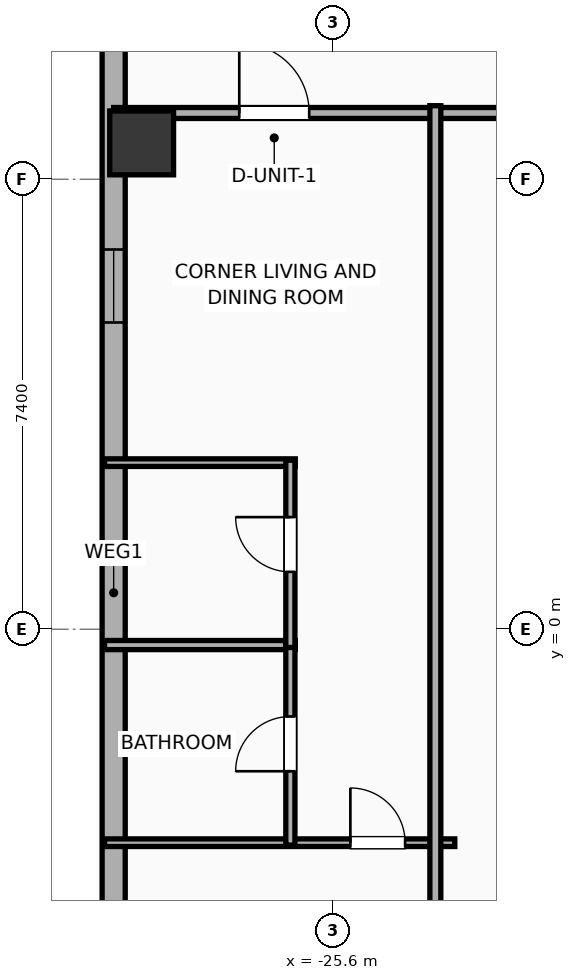
"""IFC4 building model, lengths in metres.
Left out: names, types, materials, properties, quantities, classifications, styles, units other than length and angle.
Written with IfcOpenShell. Run it as: python <this file> out.ifc"""

import sys

from ifc_helpers import new_model, si_unit, direction, frame, frame_2d, origin, origin_2d, place, context, subcontext, project, spatial, rectangle, hollow_rectangle, extrude, element, fill, save


model = new_model("IFC4")
c1 = context("Model", 3, precision=1e-05, world=origin(), true_north=direction((0.0, 1.0)))
c2 = subcontext(c1, "Body", "Model", "MODEL_VIEW")
j1 = project(units=[si_unit("LENGTHUNIT", "METRE"), si_unit("PLANEANGLEUNIT", "RADIAN")], contexts=[c1])
p1 = place(None, origin())
s1 = spatial("IfcSite", under=j1, at=p1, CompositionType="ELEMENT")
p2 = place(p1, origin())
s2 = spatial("IfcBuilding", under=s1, at=p2, CompositionType="ELEMENT")
p3 = place(p2, frame((0.0, 0.0, 105.3)))
s3 = spatial("IfcBuildingStorey", under=s2, at=p3, CompositionType="ELEMENT", Elevation=105.3)
p4 = place(p3, frame((-28.75, 7.998, 0.0), z_axis=(0.0, 0.0, 1.0), x_axis=(1.0, 0.0, 0.0)))
e1 = element("IfcColumn", 1, at=p4, inside=s3, PredefinedType="COLUMN", context=c2, shape_type="SweptSolid", body=[
    extrude(hollow_rectangle(XDim=1.05, YDim=1.05, WallThickness=0.036, at=origin_2d()), origin(), (0.0, 0.0, 1.0), 3.9),
])
p5 = place(p3, frame((-29.21, -16.581, 0.0), z_axis=(0.0, 0.0, 1.0), x_axis=(0.0, 1.0, 0.0)))
e2 = element("IfcWall", 2, at=p5, inside=s3, PredefinedType="ELEMENTEDWALL", context=c2, shape_type="SweptSolid", body=[
    extrude(rectangle(XDim=34.363, YDim=0.38, at=frame_2d((17.181, 0.0))), origin(), (0.0, 0.0, 1.0), 3.65),
])
p6 = place(p5, frame((31.087, 0.0, 0.75)))
e3 = element("IfcOpeningElement", 3, at=p6, cuts=e2, PredefinedType="OPENING", context=c2, shape_type="SweptSolid", body=[
    extrude(rectangle(XDim=1.2, YDim=2.05, at=frame_2d((0.6, 1.025))), frame((0.0, 0.2, 0.0), z_axis=(0.0, -1.0, 0.0), x_axis=(1.0, 0.0, 0.0)), (0.0, 0.0, 1.0), 0.4),
])
p7 = place(p5, frame((21.626, 0.0, 0.75)))
e4 = element("IfcOpeningElement", 4, at=p7, cuts=e2, PredefinedType="OPENING", context=c2, shape_type="SweptSolid", body=[
    extrude(rectangle(XDim=1.2, YDim=2.05, at=frame_2d((0.6, 1.025))), frame((0.0, 0.2, 0.0), z_axis=(0.0, -1.0, 0.0), x_axis=(1.0, 0.0, 0.0)), (0.0, 0.0, 1.0), 0.4),
])
p8 = place(p5, frame((10.551, 0.0, 0.75)))
e5 = element("IfcOpeningElement", 5, at=p8, cuts=e2, PredefinedType="OPENING", context=c2, shape_type="SweptSolid", body=[
    extrude(rectangle(XDim=1.2, YDim=2.05, at=frame_2d((0.6, 1.025))), frame((0.0, 0.2, 0.0), z_axis=(0.0, -1.0, 0.0), x_axis=(1.0, 0.0, 0.0)), (0.0, 0.0, 1.0), 0.4),
])
p9 = place(p3, frame((-29.21, 8.49, 0.0), z_axis=(0.0, 0.0, 1.0), x_axis=(1.0, 0.0, 0.0)))
e6 = element("IfcWall", 6, at=p9, inside=s3, PredefinedType="PARTITIONING", context=c2, shape_type="SweptSolid", body=[
    extrude(rectangle(XDim=19.33, YDim=0.18, at=frame_2d((9.665, 0.0))), origin(), (0.0, 0.0, 1.0), 3.65),
])
p10 = place(p9, frame((2.065, 0.0, 0.0)))
e7 = element("IfcOpeningElement", 7, at=p10, cuts=e6, PredefinedType="OPENING", context=c2, shape_type="SweptSolid", body=[
    extrude(rectangle(XDim=1.15, YDim=2.05, at=frame_2d((0.575, 1.025))), frame((0.0, 0.1, 0.0), z_axis=(0.0, -1.0, 0.0), x_axis=(1.0, 0.0, 0.0)), (0.0, 0.0, 1.0), 0.2),
])
p11 = place(p3, frame((-29.36, 2.74, 0.0), z_axis=(0.0, 0.0, 1.0), x_axis=(1.0, 0.0, 0.0)))
e8 = element("IfcWall", 8, at=p11, inside=s3, PredefinedType="PARTITIONING", context=c2, shape_type="SweptSolid", body=[
    extrude(rectangle(XDim=3.136, YDim=0.125, at=frame_2d((1.568, 0.0))), origin(), (0.0, 0.0, 1.0), 3.65),
])
p12 = place(p3, frame((-29.36, -0.26, 0.0), z_axis=(0.0, 0.0, 1.0), x_axis=(1.0, 0.0, 0.0)))
e9 = element("IfcWall", 9, at=p12, inside=s3, PredefinedType="PLUMBINGWALL", context=c2, shape_type="SweptSolid", body=[
    extrude(rectangle(XDim=3.136, YDim=0.15, at=frame_2d((1.568, 0.0))), origin(), (0.0, 0.0, 1.0), 3.65),
])
p13 = place(p3, frame((-29.36, -3.51, 0.0), z_axis=(0.0, 0.0, 1.0), x_axis=(1.0, 0.0, 0.0)))
e10 = element("IfcWall", 10, at=p13, inside=s3, PredefinedType="PARTITIONING", context=c2, shape_type="SweptSolid", body=[
    extrude(rectangle(XDim=5.76, YDim=0.125, at=frame_2d((2.88, 0.0))), origin(), (0.0, 0.0, 1.0), 3.65),
])
p14 = place(p13, frame((4.043, 0.0, 0.0)))
e11 = element("IfcOpeningElement", 11, at=p14, cuts=e10, PredefinedType="OPENING", context=c2, shape_type="SweptSolid", body=[
    extrude(rectangle(XDim=0.9, YDim=2.05, at=frame_2d((0.45, 1.025))), frame((0.0, 0.073, 0.0), z_axis=(0.0, -1.0, 0.0), x_axis=(1.0, 0.0, 0.0)), (0.0, 0.0, 1.0), 0.145),
])
p15 = place(p3, frame((-26.304, -3.55, 0.0), z_axis=(0.0, 0.0, 1.0), x_axis=(0.0, 1.0, 0.0)))
e12 = element("IfcWall", 12, at=p15, inside=s3, PredefinedType="PLUMBINGWALL", context=c2, shape_type="SweptSolid", body=[
    extrude(rectangle(XDim=3.33, YDim=0.15, at=frame_2d((1.665, 0.0))), origin(), (0.0, 0.0, 1.0), 3.65),
])
p16 = place(p15, frame((1.215, 0.0, 0.0)))
e13 = element("IfcOpeningElement", 13, at=p16, cuts=e12, PredefinedType="OPENING", context=c2, shape_type="SweptSolid", body=[
    extrude(rectangle(XDim=0.9, YDim=2.05, at=frame_2d((0.45, 1.025))), frame((0.0, 0.085, 0.0), z_axis=(0.0, -1.0, 0.0), x_axis=(1.0, 0.0, 0.0)), (0.0, 0.0, 1.0), 0.17),
])
p17 = place(p3, frame((-26.304, -0.3, 0.0), z_axis=(0.0, 0.0, 1.0), x_axis=(0.0, 1.0, 0.0)))
e14 = element("IfcWall", 14, at=p17, inside=s3, PredefinedType="PLUMBINGWALL", context=c2, shape_type="SweptSolid", body=[
    extrude(rectangle(XDim=3.08, YDim=0.15, at=frame_2d((1.54, 0.0))), origin(), (0.0, 0.0, 1.0), 3.65),
])
p18 = place(p17, frame((1.244, 0.0, 0.0)))
e15 = element("IfcOpeningElement", 15, at=p18, cuts=e14, PredefinedType="OPENING", context=c2, shape_type="SweptSolid", body=[
    extrude(rectangle(XDim=0.9, YDim=2.05, at=frame_2d((0.45, 1.025))), frame((0.0, 0.085, 0.0), z_axis=(0.0, -1.0, 0.0), x_axis=(1.0, 0.0, 0.0)), (0.0, 0.0, 1.0), 0.17),
])
p19 = place(p3, frame((-23.92, -8.61, 0.0), z_axis=(0.0, 0.0, 1.0), x_axis=(0.0, 1.0, 0.0)))
e16 = element("IfcWall", 16, at=p19, inside=s3, PredefinedType="PARTITIONING", context=c2, shape_type="SweptSolid", body=[
    extrude(rectangle(XDim=17.22, YDim=0.18, at=frame_2d((8.61, 0.0))), origin(), (0.0, 0.0, 1.0), 3.65),
])
p20 = place(p7, origin())
e17 = element("IfcWindow", 17, at=p20, inside=s3, PartitioningType="SINGLE_PANEL", PredefinedType="WINDOW", context=c2, shape_type="SweptSolid", body=[
    extrude(rectangle(XDim=1.2, YDim=2.05, at=frame_2d((0.6, 1.025))), frame((0.0, 0.03, 0.0), z_axis=(0.0, -1.0, 0.0), x_axis=(1.0, 0.0, 0.0)), (0.0, 0.0, 1.0), 0.06),
])
fill(e4, e17)
p21 = place(p10, origin())
e18 = element("IfcDoor", 18, at=p21, inside=s3, OperationType="SINGLE_SWING_LEFT", PredefinedType="DOOR", context=c2, shape_type="SweptSolid", body=[
    extrude(rectangle(XDim=1.15, YDim=2.05, at=frame_2d((0.575, 1.025))), frame((0.0, 0.025, 0.0), z_axis=(0.0, -1.0, 0.0), x_axis=(1.0, 0.0, 0.0)), (0.0, 0.0, 1.0), 0.05),
])
fill(e7, e18)
p22 = place(p14, origin())
e19 = element("IfcDoor", 19, at=p22, inside=s3, OperationType="SINGLE_SWING_LEFT", PredefinedType="DOOR", context=c2, shape_type="SweptSolid", body=[
    extrude(rectangle(XDim=0.9, YDim=2.05, at=frame_2d((0.45, 1.025))), frame((0.0, 0.025, 0.0), z_axis=(0.0, -1.0, 0.0), x_axis=(1.0, 0.0, 0.0)), (0.0, 0.0, 1.0), 0.05),
])
fill(e11, e19)
p23 = place(p16, origin())
e20 = element("IfcDoor", 20, at=p23, inside=s3, OperationType="SINGLE_SWING_LEFT", PredefinedType="DOOR", context=c2, shape_type="SweptSolid", body=[
    extrude(rectangle(XDim=0.9, YDim=2.05, at=frame_2d((0.45, 1.025))), frame((0.0, 0.025, 0.0), z_axis=(0.0, -1.0, 0.0), x_axis=(1.0, 0.0, 0.0)), (0.0, 0.0, 1.0), 0.05),
])
fill(e13, e20)
p24 = place(p18, origin())
e21 = element("IfcDoor", 21, at=p24, inside=s3, OperationType="SINGLE_SWING_RIGHT", PredefinedType="DOOR", context=c2, shape_type="SweptSolid", body=[
    extrude(rectangle(XDim=0.9, YDim=2.05, at=frame_2d((0.45, 1.025))), frame((0.0, 0.025, 0.0), z_axis=(0.0, -1.0, 0.0), x_axis=(1.0, 0.0, 0.0)), (0.0, 0.0, 1.0), 0.05),
])
fill(e15, e21)
save(model, sys.argv[1])
